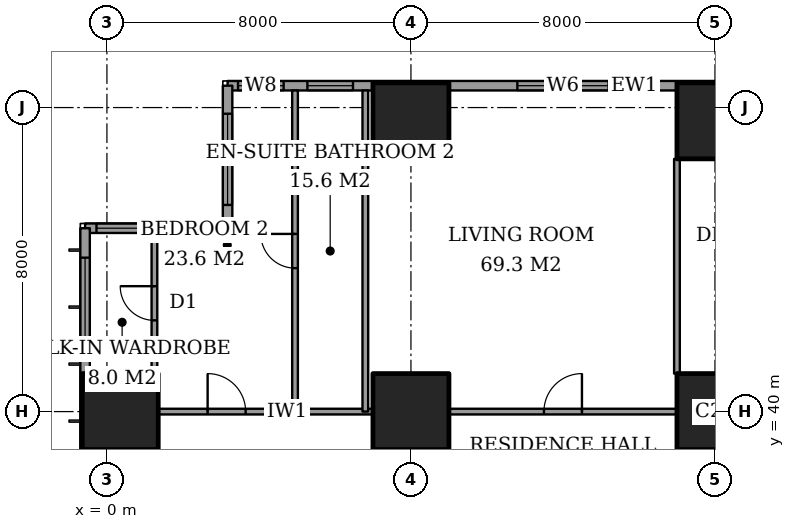
"""IFC4 building model, lengths in metres.
Left out: names, types, materials, properties, quantities, classifications, styles, units other than length and angle.
Written with IfcOpenShell. Run it as: python <this file> out.ifc"""

import sys

from ifc_helpers import new_model, si_unit, direction, frame, frame_2d, origin, origin_2d, place, context, subcontext, project, spatial, rectangle, extrude, element, fill, save


model = new_model("IFC4")
c1 = context("Model", 3, precision=1e-05, world=origin(), true_north=direction((0.0, 1.0)))
c2 = subcontext(c1, "Body", "Model", "MODEL_VIEW")
j1 = project(units=[si_unit("LENGTHUNIT", "METRE"), si_unit("PLANEANGLEUNIT", "RADIAN")], contexts=[c1])
p1 = place(None, origin())
s1 = spatial("IfcSite", under=j1, at=p1, CompositionType="ELEMENT")
p2 = place(p1, origin())
s2 = spatial("IfcBuilding", under=s1, at=p2, CompositionType="ELEMENT")
p3 = place(p2, frame((0.0, 0.0, 72.8)))
s3 = spatial("IfcBuildingStorey", under=s2, at=p3, CompositionType="ELEMENT", Elevation=72.8)
for number, where, z_axis, x_axis in (
    (1, (0.35, 40.0, 0.0), (0.0, 0.0, 1.0), (1.0, 0.0, 0.0)),
    (2, (8.0, 40.0, 0.0), (0.0, 0.0, 1.0), (1.0, 0.0, 0.0)),
    (3, (8.0, 47.65, 0.0), (0.0, 0.0, 1.0), (1.0, 0.0, 0.0)),
    (4, (16.0, 40.0, 0.0), (0.0, 0.0, 1.0), (1.0, 0.0, 0.0)),
    (5, (16.0, 47.65, 0.0), (0.0, 0.0, 1.0), (1.0, 0.0, 0.0)),
):
    element("IfcColumn", number, at=place(p3, frame(where, z_axis=z_axis, x_axis=x_axis)), inside=s3, PredefinedType="COLUMN", context=c2, shape_type="SweptSolid", body=[
        extrude(rectangle(XDim=2.0, YDim=2.0, at=origin_2d()), origin(), (0.0, 0.0, 1.0), 3.6),
    ])
p4 = place(p3, frame((24.575, 48.575, 0.0), z_axis=(0.0, 0.0, 1.0), x_axis=(-1.0, 0.0, 0.0)))
e6 = element("IfcWall", 6, at=p4, inside=s3, PredefinedType="SOLIDWALL", context=c2, shape_type="SweptSolid", body=[
    extrude(rectangle(XDim=21.4, YDim=0.25, at=frame_2d((10.7, 0.0))), origin(), (0.0, 0.0, 1.0), 3.6),
])
p5 = place(p4, frame((2.65, 0.0, 0.6)))
e7 = element("IfcOpeningElement", 7, at=p5, cuts=e6, PredefinedType="OPENING", context=c2, shape_type="SweptSolid", body=[
    extrude(rectangle(XDim=1.2, YDim=2.0, at=frame_2d((0.6, 1.0))), frame((0.0, 0.135, 0.0), z_axis=(0.0, -1.0, 0.0), x_axis=(1.0, 0.0, 0.0)), (0.0, 0.0, 1.0), 0.27),
])
p6 = place(p4, frame((5.475, 0.0, 0.6)))
e8 = element("IfcOpeningElement", 8, at=p6, cuts=e6, PredefinedType="OPENING", context=c2, shape_type="SweptSolid", body=[
    extrude(rectangle(XDim=1.2, YDim=2.0, at=frame_2d((0.6, 1.0))), frame((0.0, 0.135, 0.0), z_axis=(0.0, -1.0, 0.0), x_axis=(1.0, 0.0, 0.0)), (0.0, 0.0, 1.0), 0.27),
])
p7 = place(p4, frame((11.375, 0.0, 0.6)))
e9 = element("IfcOpeningElement", 9, at=p7, cuts=e6, PredefinedType="OPENING", context=c2, shape_type="SweptSolid", body=[
    extrude(rectangle(XDim=2.4, YDim=2.0, at=frame_2d((1.2, 1.0))), frame((0.0, 0.135, 0.0), z_axis=(0.0, -1.0, 0.0), x_axis=(1.0, 0.0, 0.0)), (0.0, 0.0, 1.0), 0.27),
])
p8 = place(p4, frame((18.1, 0.0, 0.6)))
e10 = element("IfcOpeningElement", 10, at=p8, cuts=e6, PredefinedType="OPENING", context=c2, shape_type="SweptSolid", body=[
    extrude(rectangle(XDim=1.2, YDim=2.0, at=frame_2d((0.6, 1.0))), frame((0.0, 0.135, 0.0), z_axis=(0.0, -1.0, 0.0), x_axis=(1.0, 0.0, 0.0)), (0.0, 0.0, 1.0), 0.27),
])
p9 = place(p4, frame((19.925, 0.0, 0.6)))
e11 = element("IfcOpeningElement", 11, at=p9, cuts=e6, PredefinedType="OPENING", context=c2, shape_type="SweptSolid", body=[
    extrude(rectangle(XDim=1.2, YDim=2.0, at=frame_2d((0.6, 1.0))), frame((0.0, 0.135, 0.0), z_axis=(0.0, -1.0, 0.0), x_axis=(1.0, 0.0, 0.0)), (0.0, 0.0, 1.0), 0.27),
])
p10 = place(p3, frame((3.175, 48.575, 0.0), z_axis=(0.0, 0.0, 1.0), x_axis=(0.0, -1.0, 0.0)))
e12 = element("IfcWall", 12, at=p10, inside=s3, PredefinedType="SOLIDWALL", context=c2, shape_type="SweptSolid", body=[
    extrude(rectangle(XDim=3.75, YDim=0.25, at=frame_2d((1.875, 0.0))), origin(), (0.0, 0.0, 1.0), 3.6),
])
p11 = place(p10, frame((0.738, 0.0, 0.6)))
e13 = element("IfcOpeningElement", 13, at=p11, cuts=e12, PredefinedType="OPENING", context=c2, shape_type="SweptSolid", body=[
    extrude(rectangle(XDim=2.4, YDim=2.0, at=frame_2d((1.2, 1.0))), frame((0.0, 0.135, 0.0), z_axis=(0.0, -1.0, 0.0), x_axis=(1.0, 0.0, 0.0)), (0.0, 0.0, 1.0), 0.27),
])
p12 = place(p3, frame((3.175, 44.825, 0.0), z_axis=(0.0, 0.0, 1.0), x_axis=(-1.0, 0.0, 0.0)))
e14 = element("IfcWall", 14, at=p12, inside=s3, PredefinedType="SOLIDWALL", context=c2, shape_type="SweptSolid", body=[
    extrude(rectangle(XDim=3.75, YDim=0.25, at=frame_2d((1.875, 0.0))), origin(), (0.0, 0.0, 1.0), 3.6),
])
p13 = place(p12, frame((0.363, 0.0, 0.6)))
e15 = element("IfcOpeningElement", 15, at=p13, cuts=e14, PredefinedType="OPENING", context=c2, shape_type="SweptSolid", body=[
    extrude(rectangle(XDim=1.2, YDim=2.0, at=frame_2d((0.6, 1.0))), frame((0.0, 0.135, 0.0), z_axis=(0.0, -1.0, 0.0), x_axis=(1.0, 0.0, 0.0)), (0.0, 0.0, 1.0), 0.27),
])
p14 = place(p12, frame((2.25, 0.0, 0.6)))
e16 = element("IfcOpeningElement", 16, at=p14, cuts=e14, PredefinedType="OPENING", context=c2, shape_type="SweptSolid", body=[
    extrude(rectangle(XDim=1.2, YDim=2.0, at=frame_2d((0.6, 1.0))), frame((0.0, 0.135, 0.0), z_axis=(0.0, -1.0, 0.0), x_axis=(1.0, 0.0, 0.0)), (0.0, 0.0, 1.0), 0.27),
])
p15 = place(p3, frame((-0.575, 44.825, 0.0), z_axis=(0.0, 0.0, 1.0), x_axis=(0.0, -1.0, 0.0)))
e17 = element("IfcWall", 17, at=p15, inside=s3, PredefinedType="SOLIDWALL", context=c2, shape_type="SweptSolid", body=[
    extrude(rectangle(XDim=41.65, YDim=0.25, at=frame_2d((20.825, 0.0))), origin(), (0.0, 0.0, 1.0), 3.6),
])
p16 = place(p15, frame((0.775, 0.0, 0.6)))
e18 = element("IfcOpeningElement", 18, at=p16, cuts=e17, PredefinedType="OPENING", context=c2, shape_type="SweptSolid", body=[
    extrude(rectangle(XDim=2.4, YDim=2.0, at=frame_2d((1.2, 1.0))), frame((0.0, 0.135, 0.0), z_axis=(0.0, -1.0, 0.0), x_axis=(1.0, 0.0, 0.0)), (0.0, 0.0, 1.0), 0.27),
])
p17 = place(p15, frame((6.1, 0.0, 0.6)))
e19 = element("IfcOpeningElement", 19, at=p17, cuts=e17, PredefinedType="OPENING", context=c2, shape_type="SweptSolid", body=[
    extrude(rectangle(XDim=1.2, YDim=2.0, at=frame_2d((0.6, 1.0))), frame((0.0, 0.135, 0.0), z_axis=(0.0, -1.0, 0.0), x_axis=(1.0, 0.0, 0.0)), (0.0, 0.0, 1.0), 0.27),
])
p18 = place(p15, frame((8.425, 0.0, 0.6)))
e20 = element("IfcOpeningElement", 20, at=p18, cuts=e17, PredefinedType="OPENING", context=c2, shape_type="SweptSolid", body=[
    extrude(rectangle(XDim=2.4, YDim=2.0, at=frame_2d((1.2, 1.0))), frame((0.0, 0.135, 0.0), z_axis=(0.0, -1.0, 0.0), x_axis=(1.0, 0.0, 0.0)), (0.0, 0.0, 1.0), 0.27),
])
p19 = place(p15, frame((15.625, 0.0, 0.6)))
e21 = element("IfcOpeningElement", 21, at=p19, cuts=e17, PredefinedType="OPENING", context=c2, shape_type="SweptSolid", body=[
    extrude(rectangle(XDim=2.4, YDim=2.0, at=frame_2d((1.2, 1.0))), frame((0.0, 0.135, 0.0), z_axis=(0.0, -1.0, 0.0), x_axis=(1.0, 0.0, 0.0)), (0.0, 0.0, 1.0), 0.27),
])
p20 = place(p15, frame((23.625, 0.0, 0.6)))
e22 = element("IfcOpeningElement", 22, at=p20, cuts=e17, PredefinedType="OPENING", context=c2, shape_type="SweptSolid", body=[
    extrude(rectangle(XDim=2.4, YDim=2.0, at=frame_2d((1.2, 1.0))), frame((0.0, 0.135, 0.0), z_axis=(0.0, -1.0, 0.0), x_axis=(1.0, 0.0, 0.0)), (0.0, 0.0, 1.0), 0.27),
])
p21 = place(p15, frame((30.625, 0.0, 0.6)))
e23 = element("IfcOpeningElement", 23, at=p21, cuts=e17, PredefinedType="OPENING", context=c2, shape_type="SweptSolid", body=[
    extrude(rectangle(XDim=2.4, YDim=2.0, at=frame_2d((1.2, 1.0))), frame((0.0, 0.135, 0.0), z_axis=(0.0, -1.0, 0.0), x_axis=(1.0, 0.0, 0.0)), (0.0, 0.0, 1.0), 0.27),
])
p22 = place(p15, frame((34.225, 0.0, 0.6)))
e24 = element("IfcOpeningElement", 24, at=p22, cuts=e17, PredefinedType="OPENING", context=c2, shape_type="SweptSolid", body=[
    extrude(rectangle(XDim=1.2, YDim=2.0, at=frame_2d((0.6, 1.0))), frame((0.0, 0.135, 0.0), z_axis=(0.0, -1.0, 0.0), x_axis=(1.0, 0.0, 0.0)), (0.0, 0.0, 1.0), 0.27),
])
p23 = place(p15, frame((38.475, 0.0, 0.6)))
e25 = element("IfcOpeningElement", 25, at=p23, cuts=e17, PredefinedType="OPENING", context=c2, shape_type="SweptSolid", body=[
    extrude(rectangle(XDim=2.4, YDim=2.0, at=frame_2d((1.2, 1.0))), frame((0.0, 0.135, 0.0), z_axis=(0.0, -1.0, 0.0), x_axis=(1.0, 0.0, 0.0)), (0.0, 0.0, 1.0), 0.27),
])
p24 = place(p3, frame((1.35, 40.0, 0.0), z_axis=(0.0, 0.0, 1.0), x_axis=(1.0, 0.0, 0.0)))
e26 = element("IfcWall", 26, at=p24, inside=s3, PredefinedType="PARTITIONING", context=c2, shape_type="SweptSolid", body=[
    extrude(rectangle(XDim=5.65, YDim=0.15, at=frame_2d((2.825, 0.0))), origin(), (0.0, 0.0, 1.0), 3.35),
])
p25 = place(p24, frame((1.3, 0.0, 0.0)))
e27 = element("IfcOpeningElement", 27, at=p25, cuts=e26, PredefinedType="OPENING", context=c2, shape_type="SweptSolid", body=[
    extrude(rectangle(XDim=1.0, YDim=2.1, at=frame_2d((0.5, 1.05))), frame((0.0, 0.085, 0.0), z_axis=(0.0, -1.0, 0.0), x_axis=(1.0, 0.0, 0.0)), (0.0, 0.0, 1.0), 0.17),
])
p26 = place(p3, frame((9.0, 40.0, 0.0), z_axis=(0.0, 0.0, 1.0), x_axis=(1.0, 0.0, 0.0)))
e28 = element("IfcWall", 28, at=p26, inside=s3, PredefinedType="PARTITIONING", context=c2, shape_type="SweptSolid", body=[
    extrude(rectangle(XDim=6.0, YDim=0.15, at=frame_2d((3.0, 0.0))), origin(), (0.0, 0.0, 1.0), 3.35),
])
p27 = place(p26, frame((2.5, 0.0, 0.0)))
e29 = element("IfcOpeningElement", 29, at=p27, cuts=e28, PredefinedType="OPENING", context=c2, shape_type="SweptSolid", body=[
    extrude(rectangle(XDim=1.0, YDim=2.1, at=frame_2d((0.5, 1.05))), frame((0.0, 0.085, 0.0), z_axis=(0.0, -1.0, 0.0), x_axis=(1.0, 0.0, 0.0)), (0.0, 0.0, 1.0), 0.17),
])
p28 = place(p3, frame((1.25, 41.0, 0.0), z_axis=(0.0, 0.0, 1.0), x_axis=(0.0, 1.0, 0.0)))
e30 = element("IfcWall", 30, at=p28, inside=s3, PredefinedType="PARTITIONING", context=c2, shape_type="SweptSolid", body=[
    extrude(rectangle(XDim=3.7, YDim=0.15, at=frame_2d((1.85, 0.0))), origin(), (0.0, 0.0, 1.0), 3.35),
])
p29 = place(p28, frame((1.4, 0.0, 0.0)))
e31 = element("IfcOpeningElement", 31, at=p29, cuts=e30, PredefinedType="OPENING", context=c2, shape_type="SweptSolid", body=[
    extrude(rectangle(XDim=0.9, YDim=2.1, at=frame_2d((0.45, 1.05))), frame((0.0, 0.085, 0.0), z_axis=(0.0, -1.0, 0.0), x_axis=(1.0, 0.0, 0.0)), (0.0, 0.0, 1.0), 0.17),
])
p30 = place(p3, frame((4.95, 40.0, 0.0), z_axis=(0.0, 0.0, 1.0), x_axis=(0.0, 1.0, 0.0)))
e32 = element("IfcWall", 32, at=p30, inside=s3, PredefinedType="PARTITIONING", context=c2, shape_type="SweptSolid", body=[
    extrude(rectangle(XDim=8.45, YDim=0.15, at=frame_2d((4.225, 0.0))), origin(), (0.0, 0.0, 1.0), 3.35),
])
p31 = place(p30, frame((3.775, 0.0, 0.0)))
e33 = element("IfcOpeningElement", 33, at=p31, cuts=e32, PredefinedType="OPENING", context=c2, shape_type="SweptSolid", body=[
    extrude(rectangle(XDim=0.9, YDim=2.1, at=frame_2d((0.45, 1.05))), frame((0.0, 0.085, 0.0), z_axis=(0.0, -1.0, 0.0), x_axis=(1.0, 0.0, 0.0)), (0.0, 0.0, 1.0), 0.17),
])
p32 = place(p3, frame((6.8, 40.0, 0.0), z_axis=(0.0, 0.0, 1.0), x_axis=(0.0, 1.0, 0.0)))
e34 = element("IfcWall", 34, at=p32, inside=s3, PredefinedType="PARTITIONING", context=c2, shape_type="SweptSolid", body=[
    extrude(rectangle(XDim=8.45, YDim=0.15, at=frame_2d((4.225, 0.0))), origin(), (0.0, 0.0, 1.0), 3.35),
])
p33 = place(p3, frame((15.0, 41.0, 0.0), z_axis=(0.0, 0.0, 1.0), x_axis=(0.0, 1.0, 0.0)))
e35 = element("IfcWall", 35, at=p33, inside=s3, PredefinedType="PARTITIONING", context=c2, shape_type="SweptSolid", body=[
    extrude(rectangle(XDim=5.65, YDim=0.15, at=frame_2d((2.825, 0.0))), origin(), (0.0, 0.0, 1.0), 3.35),
])
p34 = place(p7, origin())
e36 = element("IfcWindow", 36, at=p34, inside=s3, PartitioningType="SINGLE_PANEL", PredefinedType="WINDOW", context=c2, shape_type="SweptSolid", body=[
    extrude(rectangle(XDim=2.4, YDim=2.0, at=frame_2d((1.2, 1.0))), frame((0.0, 0.03, 0.0), z_axis=(0.0, -1.0, 0.0), x_axis=(1.0, 0.0, 0.0)), (0.0, 0.0, 1.0), 0.06),
])
fill(e9, e36)
p35 = place(p8, origin())
e37 = element("IfcWindow", 37, at=p35, inside=s3, PartitioningType="SINGLE_PANEL", PredefinedType="WINDOW", context=c2, shape_type="SweptSolid", body=[
    extrude(rectangle(XDim=1.2, YDim=2.0, at=frame_2d((0.6, 1.0))), frame((0.0, 0.03, 0.0), z_axis=(0.0, -1.0, 0.0), x_axis=(1.0, 0.0, 0.0)), (0.0, 0.0, 1.0), 0.06),
])
fill(e10, e37)
p36 = place(p9, origin())
e38 = element("IfcWindow", 38, at=p36, inside=s3, PartitioningType="SINGLE_PANEL", PredefinedType="WINDOW", context=c2, shape_type="SweptSolid", body=[
    extrude(rectangle(XDim=1.2, YDim=2.0, at=frame_2d((0.6, 1.0))), frame((0.0, 0.03, 0.0), z_axis=(0.0, -1.0, 0.0), x_axis=(1.0, 0.0, 0.0)), (0.0, 0.0, 1.0), 0.06),
])
fill(e11, e38)
p37 = place(p11, origin())
e39 = element("IfcWindow", 39, at=p37, inside=s3, PartitioningType="SINGLE_PANEL", PredefinedType="WINDOW", context=c2, shape_type="SweptSolid", body=[
    extrude(rectangle(XDim=2.4, YDim=2.0, at=frame_2d((1.2, 1.0))), frame((0.0, 0.03, 0.0), z_axis=(0.0, -1.0, 0.0), x_axis=(1.0, 0.0, 0.0)), (0.0, 0.0, 1.0), 0.06),
])
fill(e13, e39)
p38 = place(p13, origin())
e40 = element("IfcWindow", 40, at=p38, inside=s3, PartitioningType="SINGLE_PANEL", PredefinedType="WINDOW", context=c2, shape_type="SweptSolid", body=[
    extrude(rectangle(XDim=1.2, YDim=2.0, at=frame_2d((0.6, 1.0))), frame((0.0, 0.03, 0.0), z_axis=(0.0, -1.0, 0.0), x_axis=(1.0, 0.0, 0.0)), (0.0, 0.0, 1.0), 0.06),
])
fill(e15, e40)
p39 = place(p14, origin())
e41 = element("IfcWindow", 41, at=p39, inside=s3, PartitioningType="SINGLE_PANEL", PredefinedType="WINDOW", context=c2, shape_type="SweptSolid", body=[
    extrude(rectangle(XDim=1.2, YDim=2.0, at=frame_2d((0.6, 1.0))), frame((0.0, 0.03, 0.0), z_axis=(0.0, -1.0, 0.0), x_axis=(1.0, 0.0, 0.0)), (0.0, 0.0, 1.0), 0.06),
])
fill(e16, e41)
p40 = place(p16, origin())
e42 = element("IfcWindow", 42, at=p40, inside=s3, PartitioningType="SINGLE_PANEL", PredefinedType="WINDOW", context=c2, shape_type="SweptSolid", body=[
    extrude(rectangle(XDim=2.4, YDim=2.0, at=frame_2d((1.2, 1.0))), frame((0.0, 0.03, 0.0), z_axis=(0.0, -1.0, 0.0), x_axis=(1.0, 0.0, 0.0)), (0.0, 0.0, 1.0), 0.06),
])
fill(e18, e42)
p41 = place(p29, origin())
e43 = element("IfcDoor", 43, at=p41, inside=s3, OperationType="SINGLE_SWING_LEFT", PredefinedType="DOOR", context=c2, shape_type="SweptSolid", body=[
    extrude(rectangle(XDim=0.9, YDim=2.1, at=frame_2d((0.45, 1.05))), frame((0.0, 0.025, 0.0), z_axis=(0.0, -1.0, 0.0), x_axis=(1.0, 0.0, 0.0)), (0.0, 0.0, 1.0), 0.05),
])
fill(e31, e43)
p42 = place(p25, origin())
e44 = element("IfcDoor", 44, at=p42, inside=s3, OperationType="SINGLE_SWING_RIGHT", PredefinedType="DOOR", context=c2, shape_type="SweptSolid", body=[
    extrude(rectangle(XDim=1.0, YDim=2.1, at=frame_2d((0.5, 1.05))), frame((0.0, 0.025, 0.0), z_axis=(0.0, -1.0, 0.0), x_axis=(1.0, 0.0, 0.0)), (0.0, 0.0, 1.0), 0.05),
])
fill(e27, e44)
p43 = place(p31, origin())
e45 = element("IfcDoor", 45, at=p43, inside=s3, OperationType="SINGLE_SWING_LEFT", PredefinedType="DOOR", context=c2, shape_type="SweptSolid", body=[
    extrude(rectangle(XDim=0.9, YDim=2.1, at=frame_2d((0.45, 1.05))), frame((0.0, 0.025, 0.0), z_axis=(0.0, -1.0, 0.0), x_axis=(1.0, 0.0, 0.0)), (0.0, 0.0, 1.0), 0.05),
])
fill(e33, e45)
p44 = place(p27, origin())
e46 = element("IfcDoor", 46, at=p44, inside=s3, OperationType="SINGLE_SWING_LEFT", PredefinedType="DOOR", context=c2, shape_type="SweptSolid", body=[
    extrude(rectangle(XDim=1.0, YDim=2.1, at=frame_2d((0.5, 1.05))), frame((0.0, 0.025, 0.0), z_axis=(0.0, -1.0, 0.0), x_axis=(1.0, 0.0, 0.0)), (0.0, 0.0, 1.0), 0.05),
])
fill(e29, e46)
save(model, sys.argv[1])
